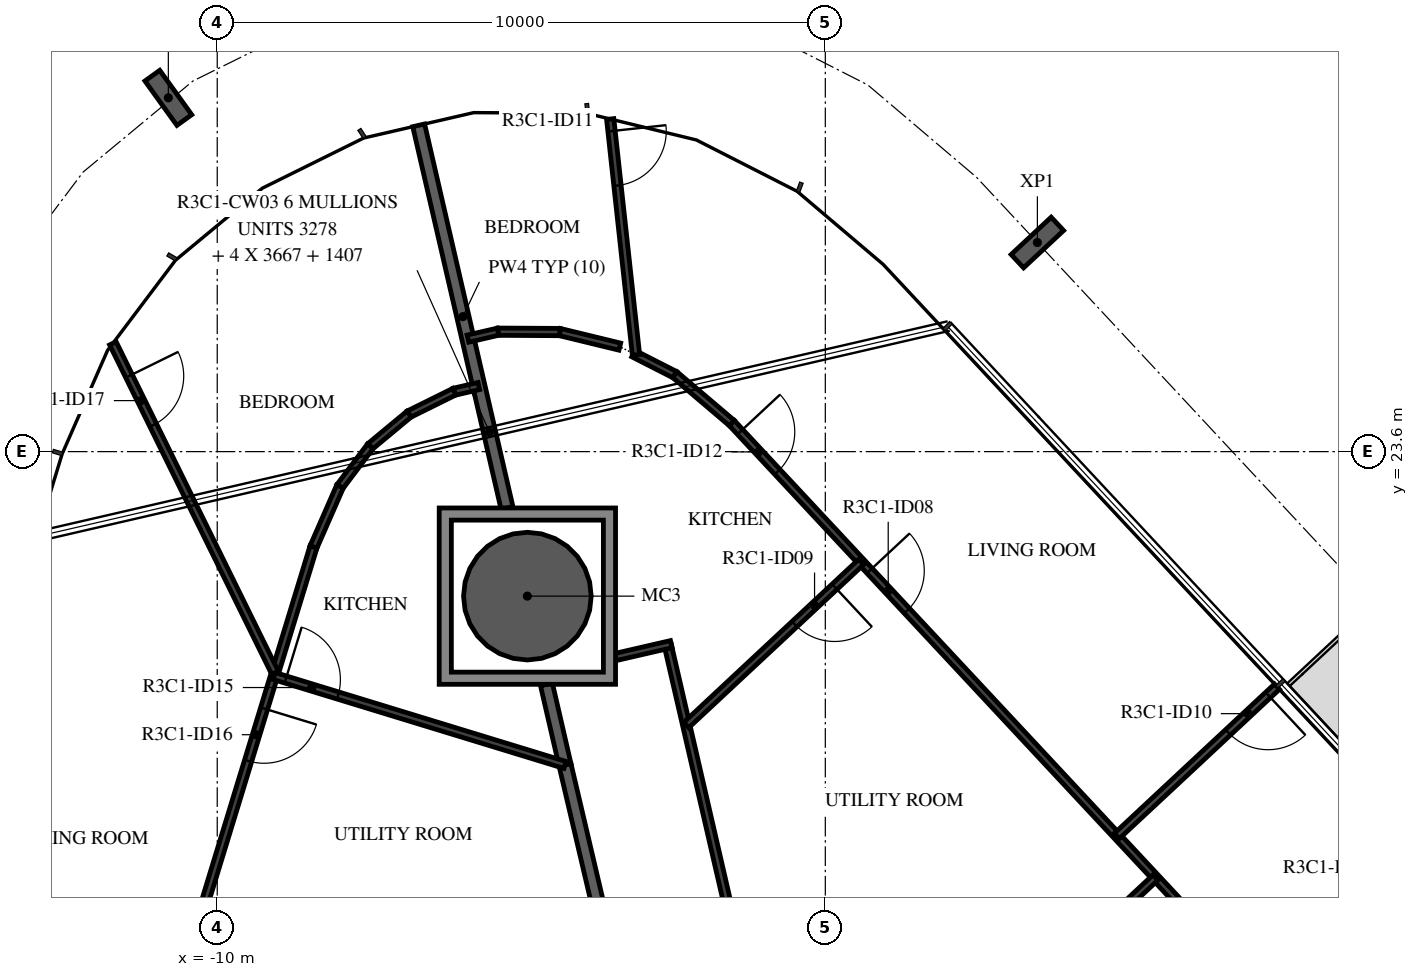
"""IFC4 building model, lengths in metres.
Left out: names, types, materials, properties, quantities, classifications, styles, units other than length and angle.
Written with IfcOpenShell. Run it as: python <this file> out.ifc"""

import sys

from ifc_helpers import new_model, si_unit, direction, frame, frame_2d, origin, origin_2d, place, context, subcontext, project, spatial, polyline, rectangle, hollow_circle, i_section, outline, extrude, element, fill, save


model = new_model("IFC4")
c1 = context("Model", 3, precision=1e-05, world=origin(), true_north=direction((0.0, 1.0)))
c2 = subcontext(c1, "Body", "Model", "MODEL_VIEW")
j1 = project(units=[si_unit("LENGTHUNIT", "METRE"), si_unit("PLANEANGLEUNIT", "RADIAN")], contexts=[c1])
p1 = place(None, origin())
s1 = spatial("IfcSite", under=j1, at=p1, CompositionType="ELEMENT")
p2 = place(p1, origin())
s2 = spatial("IfcBuilding", under=s1, at=p2, CompositionType="ELEMENT")
p3 = place(p2, frame((0.0, 0.0, 137.9)))
s3 = spatial("IfcBuildingStorey", under=s2, at=p3, CompositionType="ELEMENT", Elevation=137.9)
p4 = place(p3, frame((-4.9, 21.223, -0.38), z_axis=(0.0, 0.0, 1.0), x_axis=(1.0, 0.0, 0.0)))
e1 = element("IfcColumn", 1, at=p4, inside=s3, PredefinedType="COLUMN", context=c2, shape_type="SweptSolid", body=[
    extrude(hollow_circle(Radius=1.05, WallThickness=0.05, at=origin_2d()), origin(), (0.0, 0.0, 1.0), 3.5),
])
for number, where, z_axis, x_axis in (
    (2, (3.487, 27.039, -0.38), (0.0, 0.0, 1.0), (0.682, -0.731, 0.0)),
    (3, (-10.804, 29.418, -0.38), (0.0, 0.0, 1.0), (0.811, 0.585, 0.0)),
):
    element("IfcColumn", number, at=place(p3, frame(where, z_axis=z_axis, x_axis=x_axis)), inside=s3, PredefinedType="COLUMN", context=c2, shape_type="SweptSolid", body=[
        extrude(i_section(OverallWidth=0.3, OverallDepth=0.9, WebThickness=0.019, FlangeThickness=0.035, FilletRadius=0.03, at=origin_2d()), origin(), (0.0, 0.0, 1.0), 3.5),
    ])
p5 = place(p3, frame((-4.281, 18.448, 0.0), z_axis=(0.0, 0.0, 1.0), x_axis=(0.228867856942, -0.973457499873, 0.0)))
e4 = element("IfcWall", 4, at=p5, inside=s3, PredefinedType="STANDARD", context=c2, shape_type="SweptSolid", body=[
    extrude(rectangle(XDim=5.238, YDim=0.2, at=frame_2d((2.619, 0.0))), origin(), (0.0, 0.0, 1.0), 3.12),
])
p6 = place(p3, frame((-4.586, 19.771, 0.0), z_axis=(0.0, 0.0, 1.0), x_axis=(0.224898895484, -0.974382105136, 0.0)))
e5 = element("IfcWall", 5, at=p6, inside=s3, PredefinedType="STANDARD", context=c2, shape_type="SweptSolid", body=[
    extrude(rectangle(XDim=1.358, YDim=0.2, at=frame_2d((0.679, 0.0))), origin(), (0.0, 0.0, 1.0), 3.12),
])
p7 = place(p3, frame((-6.687, 28.966, 0.0), z_axis=(0.0, 0.0, 1.0), x_axis=(0.224945100086, -0.974371439415, 0.0)))
e6 = element("IfcWall", 6, at=p7, inside=s3, PredefinedType="STANDARD", context=c2, shape_type="SweptSolid", body=[
    extrude(rectangle(XDim=6.458, YDim=0.2, at=frame_2d((3.229, 0.0))), origin(), (0.0, 0.0, 1.0), 3.12),
])
p8 = place(p3, frame((-1.404, 15.276, 0.0), z_axis=(0.0, 0.0, 1.0), x_axis=(-0.224947305813, 0.974370930194, 0.0)))
e7 = element("IfcWall", 7, at=p8, inside=s3, PredefinedType="PARTITIONING", context=c2, shape_type="SweptSolid", body=[
    extrude(rectangle(XDim=5.28, YDim=0.12, at=frame_2d((2.64, 0.0))), origin(), (0.0, 0.0, 1.0), 3.12),
])
p9 = place(p3, frame((-2.533, 20.434, 0.0), z_axis=(0.0, 0.0, 1.0), x_axis=(-0.974387124574, -0.224877147491, 0.0)))
e8 = element("IfcWall", 8, at=p9, inside=s3, PredefinedType="PARTITIONING", context=c2, shape_type="SweptSolid", body=[
    extrude(rectangle(XDim=1.011, YDim=0.12, at=frame_2d((0.505, 0.0))), origin(), (0.0, 0.0, 1.0), 3.12),
])
p10 = place(p3, frame((-1.539, 24.071, 0.0), z_axis=(0.0, 0.0, 1.0), x_axis=(0.68200220595, -0.731350115252, 0.0)))
e9 = element("IfcWall", 9, at=p10, inside=s3, PredefinedType="PARTITIONING", context=c2, shape_type="SweptSolid", body=[
    extrude(rectangle(XDim=17.316, YDim=0.12, at=frame_2d((8.658, 0.0))), origin(), (0.0, 0.0, 1.0), 3.12),
])
p11 = place(p10, frame((3.323, 0.0, 0.0)))
e10 = element("IfcOpeningElement", 10, at=p11, cuts=e9, PredefinedType="OPENING", context=c2, shape_type="SweptSolid", body=[
    extrude(rectangle(XDim=0.9, YDim=2.1, at=frame_2d((0.45, 1.05))), frame((0.0, 0.07, 0.0), z_axis=(0.0, -1.0, 0.0), x_axis=(1.0, 0.0, 0.0)), (0.0, 0.0, 1.0), 0.14),
])
p12 = place(p10, frame((0.2, 0.0, 0.0)))
e11 = element("IfcOpeningElement", 11, at=p12, cuts=e9, PredefinedType="OPENING", context=c2, shape_type="SweptSolid", body=[
    extrude(rectangle(XDim=0.9, YDim=2.1, at=frame_2d((0.45, 1.05))), frame((0.0, 0.07, 0.0), z_axis=(0.0, -1.0, 0.0), x_axis=(1.0, 0.0, 0.0)), (0.0, 0.0, 1.0), 0.14),
])
p13 = place(p3, frame((7.427, 19.734, 0.0), z_axis=(0.0, 0.0, 1.0), x_axis=(-0.73139345201, -0.681955730497, 0.0)))
e12 = element("IfcWall", 12, at=p13, inside=s3, PredefinedType="PARTITIONING", context=c2, shape_type="SweptSolid", body=[
    extrude(rectangle(XDim=3.6, YDim=0.12, at=frame_2d((1.8, 0.0))), origin(), (0.0, 0.0, 1.0), 2.73),
])
p14 = place(p13, frame((0.2, 0.0, 0.0)))
e13 = element("IfcOpeningElement", 13, at=p14, cuts=e12, PredefinedType="OPENING", context=c2, shape_type="SweptSolid", body=[
    extrude(rectangle(XDim=0.9, YDim=2.1, at=frame_2d((0.45, 1.05))), frame((0.0, 0.07, 0.0), z_axis=(0.0, -1.0, 0.0), x_axis=(1.0, 0.0, 0.0)), (0.0, 0.0, 1.0), 0.14),
])
p15 = place(p3, frame((5.431, 16.597, 0.0), z_axis=(0.0, 0.0, 1.0), x_axis=(-0.731378807316, -0.681971436505, 0.0)))
e14 = element("IfcWall", 14, at=p15, inside=s3, PredefinedType="PARTITIONING", context=c2, shape_type="SweptSolid", body=[
    extrude(rectangle(XDim=2.609, YDim=0.12, at=frame_2d((1.305, 0.0))), origin(), (0.0, 0.0, 1.0), 3.12),
])
p16 = place(p3, frame((-3.156, 25.212, 0.0), z_axis=(0.0, 0.0, 1.0), x_axis=(0.890954246936, -0.454093085025, 0.0)))
e15 = element("IfcWall", 15, at=p16, inside=s3, PredefinedType="PARTITIONING", context=c2, shape_type="SweptSolid", body=[
    extrude(rectangle(XDim=0.765, YDim=0.12, at=frame_2d((0.383, 0.0))), origin(), (0.0, 0.0, 1.0), 3.12),
])
p17 = place(p3, frame((-2.474, 24.865, 0.0), z_axis=(0.0, 0.0, 1.0), x_axis=(0.762351487461, -0.647163201647, 0.0)))
e16 = element("IfcWall", 16, at=p17, inside=s3, PredefinedType="PARTITIONING", context=c2, shape_type="SweptSolid", body=[
    extrude(rectangle(XDim=1.227, YDim=0.12, at=frame_2d((0.614, 0.0))), origin(), (0.0, 0.0, 1.0), 3.12),
])
p18 = place(p3, frame((-3.538, 29.07, 0.0), z_axis=(0.0, 0.0, 1.0), x_axis=(0.1087420482, -0.994070001033, 0.0)))
e17 = element("IfcWall", 17, at=p18, inside=s3, PredefinedType="PARTITIONING", context=c2, shape_type="SweptSolid", body=[
    extrude(rectangle(XDim=3.902, YDim=0.12, at=frame_2d((1.951, 0.0))), origin(), (0.0, 0.0, 1.0), 3.12),
])
p19 = place(p18, frame((0.2, 0.0, 0.0)))
e18 = element("IfcOpeningElement", 18, at=p19, cuts=e17, PredefinedType="OPENING", context=c2, shape_type="SweptSolid", body=[
    extrude(rectangle(XDim=0.9, YDim=2.1, at=frame_2d((0.45, 1.05))), frame((0.0, 0.07, 0.0), z_axis=(0.0, -1.0, 0.0), x_axis=(1.0, 0.0, 0.0)), (0.0, 0.0, 1.0), 0.14),
])
p20 = place(p3, frame((0.591, 21.787, 0.0), z_axis=(0.0, 0.0, 1.0), x_axis=(-0.731364619453, -0.681986651931, 0.0)))
e19 = element("IfcWall", 19, at=p20, inside=s3, PredefinedType="PARTITIONING", context=c2, shape_type="SweptSolid", body=[
    extrude(rectangle(XDim=3.936, YDim=0.12, at=frame_2d((1.968, 0.0))), origin(), (0.0, 0.0, 1.0), 3.12),
])
p21 = place(p20, frame((0.6, 0.0, 0.0)))
e20 = element("IfcOpeningElement", 20, at=p21, cuts=e19, PredefinedType="OPENING", context=c2, shape_type="SweptSolid", body=[
    extrude(rectangle(XDim=0.9, YDim=2.1, at=frame_2d((0.45, 1.05))), frame((0.0, 0.07, 0.0), z_axis=(0.0, -1.0, 0.0), x_axis=(1.0, 0.0, 0.0)), (0.0, 0.0, 1.0), 0.14),
])
p22 = place(p3, frame((-3.379, 25.326, 0.0), z_axis=(0.0, 0.0, 1.0), x_axis=(-0.971704876381, 0.236198292157, 0.0)))
e21 = element("IfcWall", 21, at=p22, inside=s3, PredefinedType="PARTITIONING", context=c2, shape_type="SweptSolid", body=[
    extrude(rectangle(XDim=1.016, YDim=0.12, at=frame_2d((0.508, 0.0))), origin(), (0.0, 0.0, 1.0), 3.12),
])
p23 = place(p3, frame((-4.367, 25.566, 0.0), z_axis=(0.0, 0.0, 1.0), x_axis=(-0.999983366401, 0.005767748328, 0.0)))
e22 = element("IfcWall", 22, at=p23, inside=s3, PredefinedType="PARTITIONING", context=c2, shape_type="SweptSolid", body=[
    extrude(rectangle(XDim=1.016, YDim=0.12, at=frame_2d((0.508, 0.0))), origin(), (0.0, 0.0, 1.0), 3.12),
])
p24 = place(p3, frame((-5.383, 25.572, 0.0), z_axis=(0.0, 0.0, 1.0), x_axis=(-0.974366885246, -0.224964825997, 0.0)))
e23 = element("IfcWall", 23, at=p24, inside=s3, PredefinedType="PARTITIONING", context=c2, shape_type="SweptSolid", body=[
    extrude(rectangle(XDim=0.508, YDim=0.12, at=frame_2d((0.254, 0.0))), origin(), (0.0, 0.0, 1.0), 3.12),
])
p25 = place(p3, frame((-5.698, 24.679, 0.0), z_axis=(0.0, 0.0, 1.0), x_axis=(-0.974222160042, -0.225590742017, 0.0)))
e24 = element("IfcWall", 24, at=p25, inside=s3, PredefinedType="PARTITIONING", context=c2, shape_type="SweptSolid", body=[
    extrude(rectangle(XDim=0.415, YDim=0.12, at=frame_2d((0.207, 0.0))), origin(), (0.0, 0.0, 1.0), 3.12),
])
p26 = place(p3, frame((-6.101, 24.585, 0.0), z_axis=(0.0, 0.0, 1.0), x_axis=(-0.896362871824, -0.443321104862, 0.0)))
e25 = element("IfcWall", 25, at=p26, inside=s3, PredefinedType="PARTITIONING", context=c2, shape_type="SweptSolid", body=[
    extrude(rectangle(XDim=0.829, YDim=0.12, at=frame_2d((0.415, 0.0))), origin(), (0.0, 0.0, 1.0), 3.12),
])
p27 = place(p3, frame((-6.844, 24.218, 0.0), z_axis=(0.0, 0.0, 1.0), x_axis=(-0.769715611418, -0.63838693403, 0.0)))
e26 = element("IfcWall", 26, at=p27, inside=s3, PredefinedType="PARTITIONING", context=c2, shape_type="SweptSolid", body=[
    extrude(rectangle(XDim=0.829, YDim=0.12, at=frame_2d((0.415, 0.0))), origin(), (0.0, 0.0, 1.0), 3.12),
])
p28 = place(p3, frame((-7.482, 23.688, 0.0), z_axis=(0.0, 0.0, 1.0), x_axis=(-0.601836624867, -0.798619231529, 0.0)))
e27 = element("IfcWall", 27, at=p28, inside=s3, PredefinedType="PARTITIONING", context=c2, shape_type="SweptSolid", body=[
    extrude(rectangle(XDim=0.829, YDim=0.12, at=frame_2d((0.415, 0.0))), origin(), (0.0, 0.0, 1.0), 3.12),
])
p29 = place(p3, frame((-7.981, 23.027, 0.0), z_axis=(0.0, 0.0, 1.0), x_axis=(-0.401360750198, -0.915920055573, 0.0)))
e28 = element("IfcWall", 28, at=p29, inside=s3, PredefinedType="PARTITIONING", context=c2, shape_type="SweptSolid", body=[
    extrude(rectangle(XDim=1.087, YDim=0.12, at=frame_2d((0.543, 0.0))), origin(), (0.0, 0.0, 1.0), 3.12),
])
p30 = place(p3, frame((-8.417, 22.031, 0.0), z_axis=(0.0, 0.0, 1.0), x_axis=(-0.292371891841, -0.956304698755, 0.0)))
e29 = element("IfcWall", 29, at=p30, inside=s3, PredefinedType="PARTITIONING", context=c2, shape_type="SweptSolid", body=[
    extrude(rectangle(XDim=13.306, YDim=0.12, at=frame_2d((6.653, 0.0))), origin(), (0.0, 0.0, 1.0), 3.12),
])
p31 = place(p30, frame((2.777, 0.0, 0.0)))
e30 = element("IfcOpeningElement", 30, at=p31, cuts=e29, PredefinedType="OPENING", context=c2, shape_type="SweptSolid", body=[
    extrude(rectangle(XDim=0.9, YDim=2.1, at=frame_2d((0.45, 1.05))), frame((0.0, 0.07, 0.0), z_axis=(0.0, -1.0, 0.0), x_axis=(1.0, 0.0, 0.0)), (0.0, 0.0, 1.0), 0.14),
])
p32 = place(p3, frame((-9.066, 19.91, 0.0), z_axis=(0.0, 0.0, 1.0), x_axis=(0.956313309797, -0.292343724928, 0.0)))
e31 = element("IfcWall", 31, at=p32, inside=s3, PredefinedType="PARTITIONING", context=c2, shape_type="SweptSolid", body=[
    extrude(rectangle(XDim=5.004, YDim=0.12, at=frame_2d((2.502, 0.0))), origin(), (0.0, 0.0, 1.0), 3.12),
])
p33 = place(p32, frame((0.2, 0.0, 0.0)))
e32 = element("IfcOpeningElement", 32, at=p33, cuts=e31, PredefinedType="OPENING", context=c2, shape_type="SweptSolid", body=[
    extrude(rectangle(XDim=0.9, YDim=2.1, at=frame_2d((0.45, 1.05))), frame((0.0, 0.07, 0.0), z_axis=(0.0, -1.0, 0.0), x_axis=(1.0, 0.0, 0.0)), (0.0, 0.0, 1.0), 0.14),
])
p34 = place(p3, frame((-11.716, 25.381, 0.0), z_axis=(0.0, 0.0, 1.0), x_axis=(0.441576881221, -0.897223415862, 0.0)))
e33 = element("IfcWall", 33, at=p34, inside=s3, PredefinedType="PARTITIONING", context=c2, shape_type="SweptSolid", body=[
    extrude(rectangle(XDim=6.039, YDim=0.12, at=frame_2d((3.019, 0.0))), origin(), (0.0, 0.0, 1.0), 3.12),
])
p35 = place(p34, frame((0.6, 0.0, 0.0)))
e34 = element("IfcOpeningElement", 34, at=p35, cuts=e33, PredefinedType="OPENING", context=c2, shape_type="SweptSolid", body=[
    extrude(rectangle(XDim=0.9, YDim=2.1, at=frame_2d((0.45, 1.05))), frame((0.0, 0.07, 0.0), z_axis=(0.0, -1.0, 0.0), x_axis=(1.0, 0.0, 0.0)), (0.0, 0.0, 1.0), 0.14),
])
p36 = place(p3, origin())
e35 = element("IfcWall", 35, at=p36, inside=s3, PredefinedType="STANDARD", context=c2, shape_type="SweptSolid", body=[
    extrude(outline(polyline([(-3.45, 22.674), (-3.45, 19.773), (-6.35, 19.773), (-6.35, 22.674), (-3.45, 22.674)]), holes=[polyline([(-6.15, 19.973), (-3.65, 19.973), (-3.65, 22.473), (-6.15, 22.473), (-6.15, 19.973)])]), origin(), (0.0, 0.0, 1.0), 3.12),
])
p37 = place(p11, origin())
e36 = element("IfcDoor", 36, at=p37, inside=s3, OperationType="SINGLE_SWING_RIGHT", PredefinedType="DOOR", context=c2, shape_type="SweptSolid", body=[
    extrude(rectangle(XDim=0.9, YDim=2.1, at=frame_2d((0.45, 1.05))), frame((0.0, 0.025, 0.0), z_axis=(0.0, -1.0, 0.0), x_axis=(1.0, 0.0, 0.0)), (0.0, 0.0, 1.0), 0.05),
])
fill(e10, e36)
p38 = place(p21, origin())
e37 = element("IfcDoor", 37, at=p38, inside=s3, OperationType="SINGLE_SWING_RIGHT", PredefinedType="DOOR", context=c2, shape_type="SweptSolid", body=[
    extrude(rectangle(XDim=0.9, YDim=2.1, at=frame_2d((0.45, 1.05))), frame((0.0, 0.025, 0.0), z_axis=(0.0, -1.0, 0.0), x_axis=(1.0, 0.0, 0.0)), (0.0, 0.0, 1.0), 0.05),
])
fill(e20, e37)
p39 = place(p14, origin())
e38 = element("IfcDoor", 38, at=p39, inside=s3, OperationType="SINGLE_SWING_LEFT", PredefinedType="DOOR", context=c2, shape_type="SweptSolid", body=[
    extrude(rectangle(XDim=0.9, YDim=2.1, at=frame_2d((0.45, 1.05))), frame((0.0, 0.025, 0.0), z_axis=(0.0, -1.0, 0.0), x_axis=(1.0, 0.0, 0.0)), (0.0, 0.0, 1.0), 0.05),
])
fill(e13, e38)
p40 = place(p19, origin())
e39 = element("IfcDoor", 39, at=p40, inside=s3, OperationType="SINGLE_SWING_RIGHT", PredefinedType="DOOR", context=c2, shape_type="SweptSolid", body=[
    extrude(rectangle(XDim=0.9, YDim=2.1, at=frame_2d((0.45, 1.05))), frame((0.0, 0.025, 0.0), z_axis=(0.0, -1.0, 0.0), x_axis=(1.0, 0.0, 0.0)), (0.0, 0.0, 1.0), 0.05),
])
fill(e18, e39)
p41 = place(p12, origin())
e40 = element("IfcDoor", 40, at=p41, inside=s3, OperationType="SINGLE_SWING_LEFT", PredefinedType="DOOR", context=c2, shape_type="SweptSolid", body=[
    extrude(rectangle(XDim=0.9, YDim=2.1, at=frame_2d((0.45, 1.05))), frame((0.0, 0.025, 0.0), z_axis=(0.0, -1.0, 0.0), x_axis=(1.0, 0.0, 0.0)), (0.0, 0.0, 1.0), 0.05),
])
fill(e11, e40)
p42 = place(p33, origin())
e41 = element("IfcDoor", 41, at=p42, inside=s3, OperationType="SINGLE_SWING_LEFT", PredefinedType="DOOR", context=c2, shape_type="SweptSolid", body=[
    extrude(rectangle(XDim=0.9, YDim=2.1, at=frame_2d((0.45, 1.05))), frame((0.0, 0.025, 0.0), z_axis=(0.0, -1.0, 0.0), x_axis=(1.0, 0.0, 0.0)), (0.0, 0.0, 1.0), 0.05),
])
fill(e32, e41)
p43 = place(p31, origin())
e42 = element("IfcDoor", 42, at=p43, inside=s3, OperationType="SINGLE_SWING_LEFT", PredefinedType="DOOR", context=c2, shape_type="SweptSolid", body=[
    extrude(rectangle(XDim=0.9, YDim=2.1, at=frame_2d((0.45, 1.05))), frame((0.0, 0.025, 0.0), z_axis=(0.0, -1.0, 0.0), x_axis=(1.0, 0.0, 0.0)), (0.0, 0.0, 1.0), 0.05),
])
fill(e30, e42)
p44 = place(p35, origin())
e43 = element("IfcDoor", 43, at=p44, inside=s3, OperationType="SINGLE_SWING_LEFT", PredefinedType="DOOR", context=c2, shape_type="SweptSolid", body=[
    extrude(rectangle(XDim=0.9, YDim=2.1, at=frame_2d((0.45, 1.05))), frame((0.0, 0.025, 0.0), z_axis=(0.0, -1.0, 0.0), x_axis=(1.0, 0.0, 0.0)), (0.0, 0.0, 1.0), 0.05),
])
fill(e34, e43)
save(model, sys.argv[1])
